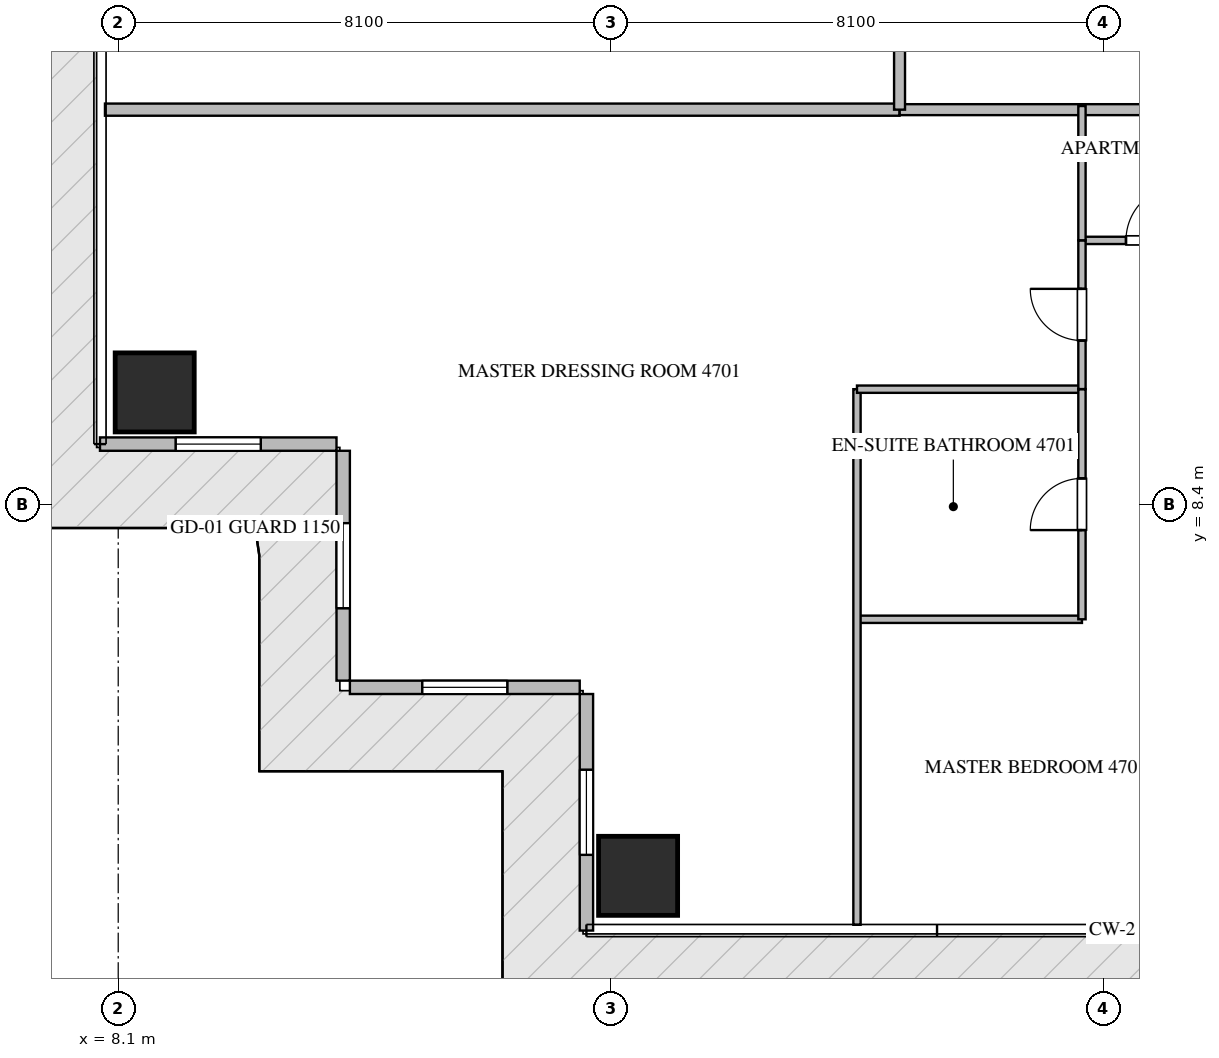
"""IFC4 building model, lengths in metres.
Left out: names, types, materials, properties, quantities, classifications, styles, units other than length and angle.
Written with IfcOpenShell. Run it as: python <this file> out.ifc"""

import sys

from ifc_helpers import new_model, si_unit, direction, frame, frame_2d, origin, origin_2d, place, context, subcontext, project, spatial, rectangle, extrude, source, transform, mapped, element, fill, save


model = new_model("IFC4")
c1 = context("Model", 3, precision=1e-05, world=origin(), true_north=direction((0.0, 1.0)))
c2 = subcontext(c1, "Body", "Model", "MODEL_VIEW")
j1 = project(units=[si_unit("LENGTHUNIT", "METRE"), si_unit("PLANEANGLEUNIT", "RADIAN")], contexts=[c1])
p1 = place(None, origin())
s1 = spatial("IfcSite", under=j1, at=p1, CompositionType="ELEMENT")
p2 = place(p1, origin())
s2 = spatial("IfcBuilding", under=s1, at=p2, CompositionType="ELEMENT")
p3 = place(p2, frame((0.0, 0.0, 187.65)))
s3 = spatial("IfcBuildingStorey", under=s2, at=p3, CompositionType="ELEMENT", Elevation=187.65)
m1 = source(origin(), c2, "Body", "SweptSolid", [
    extrude(rectangle(XDim=1.3, YDim=1.3, at=origin_2d()), origin(), (0.0, 0.0, 1.0), 3.75),
])
for number, where, z_axis, x_axis in (
    (1, (16.65, 2.3, -0.26), (0.0, 0.0, 1.0), (1.0, 0.0, 0.0)),
    (2, (8.7, 10.25, -0.26), (0.0, 0.0, 1.0), (1.0, 0.0, 0.0)),
):
    element("IfcColumn", number, at=place(p3, frame(where, z_axis=z_axis, x_axis=x_axis)), inside=s3, PredefinedType="COLUMN", context=c2, shape_type="MappedRepresentation", body=[
        mapped(m1, transform((0.0, 0.0, 0.0), scale=1.0)),
    ])
p4 = place(p3, frame((7.8, 9.4, 0.0), z_axis=(0.0, 0.0, 1.0), x_axis=(1.0, 0.0, 0.0)))
e3 = element("IfcWall", 3, at=p4, inside=s3, PredefinedType="ELEMENTEDWALL", context=c2, shape_type="SweptSolid", body=[
    extrude(rectangle(XDim=3.89, YDim=0.22, at=frame_2d((1.945, 0.0))), origin(), (0.0, 0.0, 1.0), 3.475),
])
p5 = place(p4, frame((1.245, 0.0, 0.65)))
e4 = element("IfcOpeningElement", 4, at=p5, cuts=e3, PredefinedType="OPENING", context=c2, shape_type="SweptSolid", body=[
    extrude(rectangle(XDim=1.4, YDim=2.05, at=frame_2d((0.7, 1.025))), frame((0.0, 0.12, 0.0), z_axis=(0.0, -1.0, 0.0), x_axis=(1.0, 0.0, 0.0)), (0.0, 0.0, 1.0), 0.24),
])
p6 = place(p3, frame((11.8, 9.29, 0.0), z_axis=(0.0, 0.0, 1.0), x_axis=(0.0, -1.0, 0.0)))
e5 = element("IfcWall", 5, at=p6, inside=s3, PredefinedType="ELEMENTEDWALL", context=c2, shape_type="SweptSolid", body=[
    extrude(rectangle(XDim=3.78, YDim=0.22, at=frame_2d((1.89, 0.0))), origin(), (0.0, 0.0, 1.0), 3.475),
])
p7 = place(p6, frame((1.19, 0.0, 0.65)))
e6 = element("IfcOpeningElement", 6, at=p7, cuts=e5, PredefinedType="OPENING", context=c2, shape_type="SweptSolid", body=[
    extrude(rectangle(XDim=1.4, YDim=2.05, at=frame_2d((0.7, 1.025))), frame((0.0, 0.12, 0.0), z_axis=(0.0, -1.0, 0.0), x_axis=(1.0, 0.0, 0.0)), (0.0, 0.0, 1.0), 0.24),
])
p8 = place(p3, frame((11.91, 5.4, 0.0), z_axis=(0.0, 0.0, 1.0), x_axis=(1.0, 0.0, 0.0)))
e7 = element("IfcWall", 7, at=p8, inside=s3, PredefinedType="ELEMENTEDWALL", context=c2, shape_type="SweptSolid", body=[
    extrude(rectangle(XDim=3.78, YDim=0.22, at=frame_2d((1.89, 0.0))), origin(), (0.0, 0.0, 1.0), 3.475),
])
p9 = place(p8, frame((1.19, 0.0, 0.65)))
e8 = element("IfcOpeningElement", 8, at=p9, cuts=e7, PredefinedType="OPENING", context=c2, shape_type="SweptSolid", body=[
    extrude(rectangle(XDim=1.4, YDim=2.05, at=frame_2d((0.7, 1.025))), frame((0.0, 0.12, 0.0), z_axis=(0.0, -1.0, 0.0), x_axis=(1.0, 0.0, 0.0)), (0.0, 0.0, 1.0), 0.24),
])
p10 = place(p3, frame((15.8, 5.29, 0.0), z_axis=(0.0, 0.0, 1.0), x_axis=(0.0, -1.0, 0.0)))
e9 = element("IfcWall", 9, at=p10, inside=s3, PredefinedType="ELEMENTEDWALL", context=c2, shape_type="SweptSolid", body=[
    extrude(rectangle(XDim=3.89, YDim=0.22, at=frame_2d((1.945, 0.0))), origin(), (0.0, 0.0, 1.0), 3.475),
])
p11 = place(p10, frame((1.245, 0.0, 0.65)))
e10 = element("IfcOpeningElement", 10, at=p11, cuts=e9, PredefinedType="OPENING", context=c2, shape_type="SweptSolid", body=[
    extrude(rectangle(XDim=1.4, YDim=2.05, at=frame_2d((0.7, 1.025))), frame((0.0, 0.12, 0.0), z_axis=(0.0, -1.0, 0.0), x_axis=(1.0, 0.0, 0.0)), (0.0, 0.0, 1.0), 0.24),
])
p12 = place(p3, frame((7.882, 14.9, 0.0), z_axis=(0.0, 0.0, 1.0), x_axis=(1.0, 0.0, 0.0)))
e11 = element("IfcWall", 11, at=p12, inside=s3, PredefinedType="PARTITIONING", context=c2, shape_type="SweptSolid", body=[
    extrude(rectangle(XDim=13.068, YDim=0.2, at=frame_2d((6.534, 0.0))), origin(), (0.0, 0.0, 1.0), 3.49),
])
p13 = place(p3, frame((20.952, 14.9, 0.0), z_axis=(0.0, 0.0, 1.0), x_axis=(1.0, 0.0, 0.0)))
e12 = element("IfcWall", 12, at=p13, inside=s3, PredefinedType="PARTITIONING", context=c2, shape_type="SweptSolid", body=[
    extrude(rectangle(XDim=22.896, YDim=0.18, at=frame_2d((11.448, 0.0))), origin(), (0.0, 0.0, 1.0), 3.49),
])
p14 = place(p13, frame((15.809, 0.0, 0.0)))
e13 = element("IfcOpeningElement", 13, at=p14, cuts=e12, PredefinedType="OPENING", context=c2, shape_type="SweptSolid", body=[
    extrude(rectangle(XDim=1.0, YDim=2.15, at=frame_2d((0.5, 1.075))), frame((0.0, 0.1, 0.0), z_axis=(0.0, -1.0, 0.0), x_axis=(1.0, 0.0, 0.0)), (0.0, 0.0, 1.0), 0.2),
])
p15 = place(p3, frame((20.95, 14.9, 0.0), z_axis=(0.0, 0.0, 1.0), x_axis=(0.0, 1.0, 0.0)))
e14 = element("IfcWall", 14, at=p15, inside=s3, PredefinedType="PARTITIONING", context=c2, shape_type="SweptSolid", body=[
    extrude(rectangle(XDim=18.7, YDim=0.18, at=frame_2d((9.35, 0.0))), origin(), (0.0, 0.0, 1.0), 3.49),
])
p16 = place(p15, frame((1.805, 0.0, 0.0)))
e15 = element("IfcOpeningElement", 15, at=p16, cuts=e14, PredefinedType="OPENING", context=c2, shape_type="SweptSolid", body=[
    extrude(rectangle(XDim=1.0, YDim=2.15, at=frame_2d((0.5, 1.075))), frame((0.0, 0.1, 0.0), z_axis=(0.0, -1.0, 0.0), x_axis=(1.0, 0.0, 0.0)), (0.0, 0.0, 1.0), 0.2),
])
p17 = place(p3, frame((23.95, 12.75, 0.0), z_axis=(0.0, 0.0, 1.0), x_axis=(1.0, 0.0, 0.0)))
e16 = element("IfcWall", 16, at=p17, inside=s3, PredefinedType="PARTITIONING", context=c2, shape_type="SweptSolid", body=[
    extrude(rectangle(XDim=2.348, YDim=0.12, at=frame_2d((1.174, 0.0))), origin(), (0.0, 0.0, 1.0), 3.49),
])
p18 = place(p17, frame((0.724, 0.0, 0.0)))
e17 = element("IfcOpeningElement", 17, at=p18, cuts=e16, PredefinedType="OPENING", context=c2, shape_type="SweptSolid", body=[
    extrude(rectangle(XDim=0.9, YDim=2.1, at=frame_2d((0.45, 1.05))), frame((0.0, 0.07, 0.0), z_axis=(0.0, -1.0, 0.0), x_axis=(1.0, 0.0, 0.0)), (0.0, 0.0, 1.0), 0.14),
])
p19 = place(p3, frame((20.25, 6.519, 0.0), z_axis=(0.0, 0.0, 1.0), x_axis=(1.0, 0.0, 0.0)))
e18 = element("IfcWall", 18, at=p19, inside=s3, PredefinedType="PARTITIONING", context=c2, shape_type="SweptSolid", body=[
    extrude(rectangle(XDim=3.7, YDim=0.12, at=frame_2d((1.85, 0.0))), origin(), (0.0, 0.0, 1.0), 3.49),
])
p20 = place(p3, frame((20.25, 1.495, 0.0), z_axis=(0.0, 0.0, 1.0), x_axis=(0.0, 1.0, 0.0)))
e19 = element("IfcWall", 19, at=p20, inside=s3, PredefinedType="PARTITIONING", context=c2, shape_type="SweptSolid", body=[
    extrude(rectangle(XDim=8.808, YDim=0.12, at=frame_2d((4.404, 0.0))), origin(), (0.0, 0.0, 1.0), 3.49),
])
p21 = place(p3, frame((20.25, 10.303, 0.0), z_axis=(0.0, 0.0, 1.0), x_axis=(1.0, 0.0, 0.0)))
e20 = element("IfcWall", 20, at=p21, inside=s3, PredefinedType="PARTITIONING", context=c2, shape_type="SweptSolid", body=[
    extrude(rectangle(XDim=3.7, YDim=0.12, at=frame_2d((1.85, 0.0))), origin(), (0.0, 0.0, 1.0), 2.972),
])
p22 = place(p3, frame((23.95, 6.519, 0.0), z_axis=(0.0, 0.0, 1.0), x_axis=(0.0, 1.0, 0.0)))
e21 = element("IfcWall", 21, at=p22, inside=s3, PredefinedType="PARTITIONING", context=c2, shape_type="SweptSolid", body=[
    extrude(rectangle(XDim=3.784, YDim=0.12, at=frame_2d((1.892, 0.0))), origin(), (0.0, 0.0, 1.0), 3.49),
])
p23 = place(p22, frame((1.467, 0.0, 0.0)))
e22 = element("IfcOpeningElement", 22, at=p23, cuts=e21, PredefinedType="OPENING", context=c2, shape_type="SweptSolid", body=[
    extrude(rectangle(XDim=0.85, YDim=2.1, at=frame_2d((0.425, 1.05))), frame((0.0, 0.07, 0.0), z_axis=(0.0, -1.0, 0.0), x_axis=(1.0, 0.0, 0.0)), (0.0, 0.0, 1.0), 0.14),
])
p24 = place(p3, frame((23.95, 10.305, 0.0), z_axis=(0.0, 0.0, 1.0), x_axis=(0.0, 1.0, 0.0)))
e23 = element("IfcWall", 23, at=p24, inside=s3, PredefinedType="PARTITIONING", context=c2, shape_type="SweptSolid", body=[
    extrude(rectangle(XDim=2.445, YDim=0.12, at=frame_2d((1.223, 0.0))), origin(), (0.0, 0.0, 1.0), 3.49),
])
p25 = place(p24, frame((0.798, 0.0, 0.0)))
e24 = element("IfcOpeningElement", 24, at=p25, cuts=e23, PredefinedType="OPENING", context=c2, shape_type="SweptSolid", body=[
    extrude(rectangle(XDim=0.85, YDim=2.1, at=frame_2d((0.425, 1.05))), frame((0.0, 0.07, 0.0), z_axis=(0.0, -1.0, 0.0), x_axis=(1.0, 0.0, 0.0)), (0.0, 0.0, 1.0), 0.14),
])
p26 = place(p3, frame((23.95, 12.752, 0.0), z_axis=(0.0, 0.0, 1.0), x_axis=(0.0, 1.0, 0.0)))
e25 = element("IfcWall", 25, at=p26, inside=s3, PredefinedType="PARTITIONING", context=c2, shape_type="SweptSolid", body=[
    extrude(rectangle(XDim=2.208, YDim=0.12, at=frame_2d((1.104, 0.0))), origin(), (0.0, 0.0, 1.0), 3.49),
])
m2 = source(origin(), c2, "Body", "SweptSolid", [
    extrude(rectangle(XDim=1.4, YDim=2.05, at=frame_2d((0.7, 1.025))), frame((0.0, 0.03, 0.0), z_axis=(0.0, -1.0, 0.0), x_axis=(1.0, 0.0, 0.0)), (0.0, 0.0, 1.0), 0.06),
])
p27 = place(p5, origin())
e26 = element("IfcWindow", 26, at=p27, inside=s3, PartitioningType="SINGLE_PANEL", PredefinedType="WINDOW", context=c2, shape_type="MappedRepresentation", body=[
    mapped(m2, transform((0.0, 0.0, 0.0), scale=1.0)),
])
fill(e4, e26)
p28 = place(p7, origin())
e27 = element("IfcWindow", 27, at=p28, inside=s3, PartitioningType="SINGLE_PANEL", PredefinedType="WINDOW", context=c2, shape_type="MappedRepresentation", body=[
    mapped(m2, transform((0.0, 0.0, 0.0), scale=1.0)),
])
fill(e6, e27)
p29 = place(p9, origin())
e28 = element("IfcWindow", 28, at=p29, inside=s3, PartitioningType="SINGLE_PANEL", PredefinedType="WINDOW", context=c2, shape_type="MappedRepresentation", body=[
    mapped(m2, transform((0.0, 0.0, 0.0), scale=1.0)),
])
fill(e8, e28)
p30 = place(p11, origin())
e29 = element("IfcWindow", 29, at=p30, inside=s3, PartitioningType="SINGLE_PANEL", PredefinedType="WINDOW", context=c2, shape_type="MappedRepresentation", body=[
    mapped(m2, transform((0.0, 0.0, 0.0), scale=1.0)),
])
fill(e10, e29)
m3 = source(origin(), c2, "Body", "SweptSolid", [
    extrude(rectangle(XDim=0.9, YDim=2.1, at=frame_2d((0.45, 1.05))), frame((0.0, 0.025, 0.0), z_axis=(0.0, -1.0, 0.0), x_axis=(1.0, 0.0, 0.0)), (0.0, 0.0, 1.0), 0.05),
])
p31 = place(p18, origin())
e30 = element("IfcDoor", 30, at=p31, inside=s3, OperationType="SINGLE_SWING_RIGHT", PredefinedType="DOOR", context=c2, shape_type="MappedRepresentation", body=[
    mapped(m3, transform((0.0, 0.0, 0.0), scale=1.0)),
])
fill(e17, e30)
m4 = source(origin(), c2, "Body", "SweptSolid", [
    extrude(rectangle(XDim=0.85, YDim=2.1, at=frame_2d((0.425, 1.05))), frame((0.0, 0.025, 0.0), z_axis=(0.0, -1.0, 0.0), x_axis=(1.0, 0.0, 0.0)), (0.0, 0.0, 1.0), 0.05),
])
p32 = place(p23, origin())
e31 = element("IfcDoor", 31, at=p32, inside=s3, OperationType="SINGLE_SWING_LEFT", PredefinedType="DOOR", context=c2, shape_type="MappedRepresentation", body=[
    mapped(m4, transform((0.0, 0.0, 0.0), scale=1.0)),
])
fill(e22, e31)
p33 = place(p25, origin())
e32 = element("IfcDoor", 32, at=p33, inside=s3, OperationType="SINGLE_SWING_RIGHT", PredefinedType="DOOR", context=c2, shape_type="MappedRepresentation", body=[
    mapped(m4, transform((0.0, 0.0, 0.0), scale=1.0)),
])
fill(e24, e32)
save(model, sys.argv[1])
